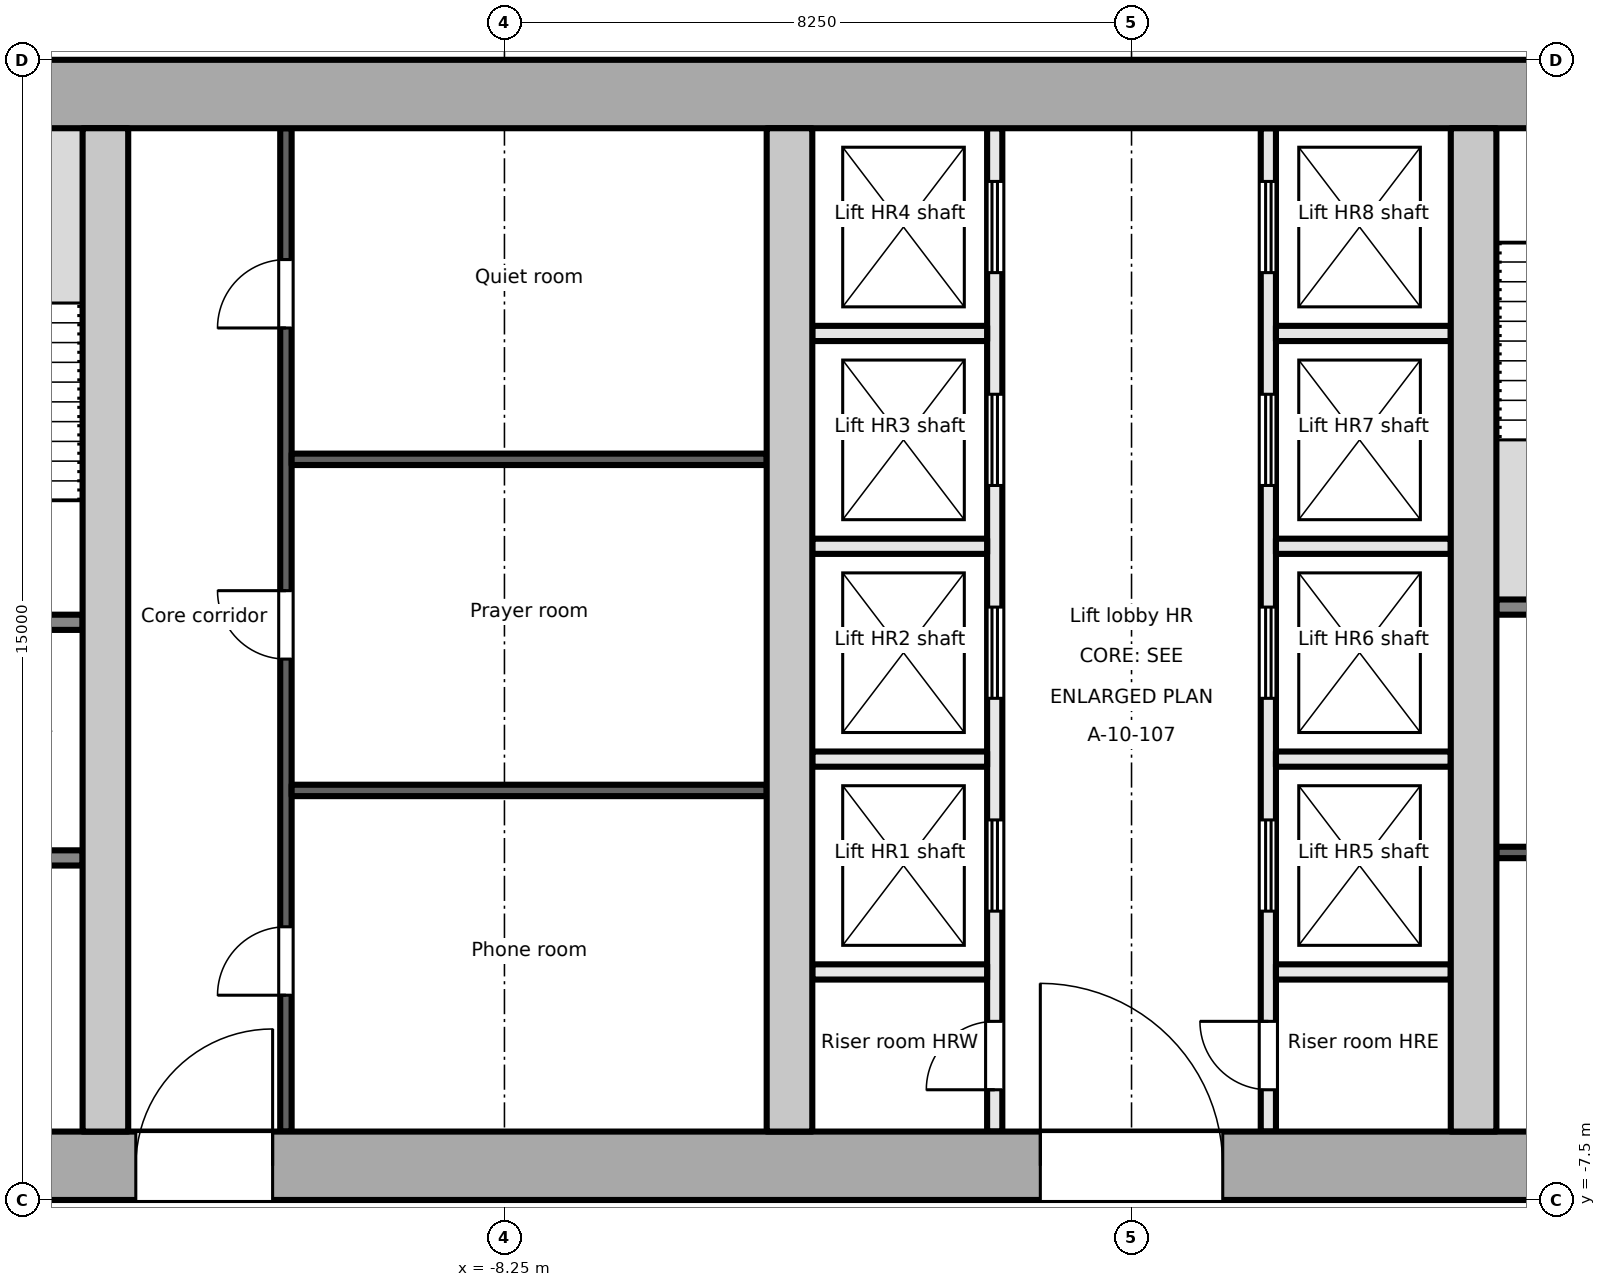
"""IFC4 building model, lengths in metres.
Left out: names, types, materials, properties, quantities, classifications, styles, units other than length and angle.
Written with IfcOpenShell. Run it as: python <this file> out.ifc"""

import sys

from ifc_helpers import new_model, si_unit, direction, frame, frame_2d, origin, place, context, subcontext, project, spatial, rectangle, extrude, element, fill, save


model = new_model("IFC4")
c1 = context("Model", 3, precision=1e-05, world=origin(), true_north=direction((0.0, 1.0)))
c2 = subcontext(c1, "Body", "Model", "MODEL_VIEW")
j1 = project(units=[si_unit("LENGTHUNIT", "METRE"), si_unit("PLANEANGLEUNIT", "RADIAN")], contexts=[c1])
p1 = place(None, origin())
s1 = spatial("IfcSite", under=j1, at=p1, CompositionType="ELEMENT")
p2 = place(p1, origin())
s2 = spatial("IfcBuilding", under=s1, at=p2, CompositionType="ELEMENT")
p3 = place(p2, frame((0.0, 0.0, 217.4)))
s3 = spatial("IfcBuildingStorey", under=s2, at=p3, CompositionType="ELEMENT", Elevation=217.4)
p4 = place(p3, frame((-18.0, -7.05, -0.2), z_axis=(0.0, 0.0, 1.0), x_axis=(1.0, 0.0, 0.0)))
e1 = element("IfcWall", 1, at=p4, inside=s3, PredefinedType="SHEAR", context=c2, shape_type="SweptSolid", body=[
    extrude(rectangle(XDim=36.0, YDim=0.9, at=frame_2d((18.0, 0.0))), origin(), (0.0, 0.0, 1.0), 3.9),
])
p5 = place(p4, frame((4.9, 0.0, 0.2)))
e2 = element("IfcOpeningElement", 2, at=p5, cuts=e1, PredefinedType="OPENING", context=c2, shape_type="SweptSolid", body=[
    extrude(rectangle(XDim=1.8, YDim=2.1, at=frame_2d((0.9, 1.05))), frame((0.0, 0.46, 0.0), z_axis=(0.0, -1.0, 0.0), x_axis=(1.0, 0.0, 0.0)), (0.0, 0.0, 1.0), 0.921),
])
p6 = place(p4, frame((16.8, 0.0, 0.2)))
e3 = element("IfcOpeningElement", 3, at=p6, cuts=e1, PredefinedType="OPENING", context=c2, shape_type="SweptSolid", body=[
    extrude(rectangle(XDim=2.4, YDim=2.1, at=frame_2d((1.2, 1.05))), frame((0.0, 0.46, 0.0), z_axis=(0.0, -1.0, 0.0), x_axis=(1.0, 0.0, 0.0)), (0.0, 0.0, 1.0), 0.921),
])
p7 = place(p4, frame((26.1, 0.0, 0.2)))
e4 = element("IfcOpeningElement", 4, at=p7, cuts=e1, PredefinedType="OPENING", context=c2, shape_type="SweptSolid", body=[
    extrude(rectangle(XDim=2.4, YDim=2.1, at=frame_2d((1.2, 1.05))), frame((0.0, 0.46, 0.0), z_axis=(0.0, -1.0, 0.0), x_axis=(1.0, 0.0, 0.0)), (0.0, 0.0, 1.0), 0.921),
])
p8 = place(p3, frame((-18.0, 7.05, -0.2), z_axis=(0.0, 0.0, 1.0), x_axis=(1.0, 0.0, 0.0)))
e5 = element("IfcWall", 5, at=p8, inside=s3, PredefinedType="SHEAR", context=c2, shape_type="SweptSolid", body=[
    extrude(rectangle(XDim=36.0, YDim=0.9, at=frame_2d((18.0, 0.0))), origin(), (0.0, 0.0, 1.0), 3.9),
])
for number, where, z_axis, x_axis in (
    (6, (-13.5, -6.6, -0.2), (0.0, 0.0, 1.0), (0.0, 1.0, 0.0)),
    (7, (-4.5, -6.6, -0.2), (0.0, 0.0, 1.0), (0.0, 1.0, 0.0)),
    (8, (4.5, -6.6, -0.2), (0.0, 0.0, 1.0), (0.0, 1.0, 0.0)),
):
    element("IfcWall", number, at=place(p3, frame(where, z_axis=z_axis, x_axis=x_axis)), inside=s3, PredefinedType="SHEAR", context=c2, shape_type="SweptSolid", body=[
        extrude(rectangle(XDim=13.2, YDim=0.6, at=frame_2d((6.6, 0.0))), origin(), (0.0, 0.0, 1.0), 3.9),
    ])
p9 = place(p3, frame((-17.1, -3.0, 0.0), z_axis=(0.0, 0.0, 1.0), x_axis=(1.0, 0.0, 0.0)))
e9 = element("IfcWall", 9, at=p9, inside=s3, PredefinedType="PARTITIONING", context=c2, shape_type="SweptSolid", body=[
    extrude(rectangle(XDim=3.3, YDim=0.2, at=frame_2d((1.65, 0.0))), origin(), (0.0, 0.0, 1.0), 3.7),
])
p10 = place(p9, frame((1.1, 0.0, 0.0)))
e10 = element("IfcOpeningElement", 10, at=p10, cuts=e9, PredefinedType="OPENING", context=c2, shape_type="SweptSolid", body=[
    extrude(rectangle(XDim=1.1, YDim=2.1, at=frame_2d((0.55, 1.05))), frame((0.0, 0.111, 0.0), z_axis=(0.0, -1.0, 0.0), x_axis=(1.0, 0.0, 0.0)), (0.0, 0.0, 1.0), 0.221),
])
p11 = place(p3, frame((-17.1, 0.1, 0.0), z_axis=(0.0, 0.0, 1.0), x_axis=(1.0, 0.0, 0.0)))
e11 = element("IfcWall", 11, at=p11, inside=s3, PredefinedType="PARTITIONING", context=c2, shape_type="SweptSolid", body=[
    extrude(rectangle(XDim=3.3, YDim=0.2, at=frame_2d((1.65, 0.0))), origin(), (0.0, 0.0, 1.0), 3.7),
])
p12 = place(p11, frame((1.1, 0.0, 0.0)))
e12 = element("IfcOpeningElement", 12, at=p12, cuts=e11, PredefinedType="OPENING", context=c2, shape_type="SweptSolid", body=[
    extrude(rectangle(XDim=1.1, YDim=2.1, at=frame_2d((0.55, 1.05))), frame((0.0, 0.111, 0.0), z_axis=(0.0, -1.0, 0.0), x_axis=(1.0, 0.0, 0.0)), (0.0, 0.0, 1.0), 0.221),
])
p13 = place(p3, frame((-11.125, -6.6, 0.0), z_axis=(0.0, 0.0, 1.0), x_axis=(0.0, 1.0, 0.0)))
e13 = element("IfcWall", 13, at=p13, inside=s3, PredefinedType="PARTITIONING", context=c2, shape_type="SweptSolid", body=[
    extrude(rectangle(XDim=13.2, YDim=0.15, at=frame_2d((6.6, 0.0))), origin(), (0.0, 0.0, 1.0), 3.7),
])
p14 = place(p13, frame((1.794, 0.0, 0.0)))
e14 = element("IfcOpeningElement", 14, at=p14, cuts=e13, PredefinedType="OPENING", context=c2, shape_type="SweptSolid", body=[
    extrude(rectangle(XDim=0.9, YDim=2.1, at=frame_2d((0.45, 1.05))), frame((0.0, 0.085, 0.0), z_axis=(0.0, -1.0, 0.0), x_axis=(1.0, 0.0, 0.0)), (0.0, 0.0, 1.0), 0.171),
])
p15 = place(p13, frame((6.216, 0.0, 0.0)))
e15 = element("IfcOpeningElement", 15, at=p15, cuts=e13, PredefinedType="OPENING", context=c2, shape_type="SweptSolid", body=[
    extrude(rectangle(XDim=0.9, YDim=2.1, at=frame_2d((0.45, 1.05))), frame((0.0, 0.085, 0.0), z_axis=(0.0, -1.0, 0.0), x_axis=(1.0, 0.0, 0.0)), (0.0, 0.0, 1.0), 0.171),
])
p16 = place(p13, frame((10.572, 0.0, 0.0)))
e16 = element("IfcOpeningElement", 16, at=p16, cuts=e13, PredefinedType="OPENING", context=c2, shape_type="SweptSolid", body=[
    extrude(rectangle(XDim=0.9, YDim=2.1, at=frame_2d((0.45, 1.05))), frame((0.0, 0.085, 0.0), z_axis=(0.0, -1.0, 0.0), x_axis=(1.0, 0.0, 0.0)), (0.0, 0.0, 1.0), 0.171),
])
for number, where, z_axis, x_axis in (
    (17, (-11.05, -2.112, 0.0), (0.0, 0.0, 1.0), (1.0, 0.0, 0.0)),
    (18, (-11.05, 2.244, 0.0), (0.0, 0.0, 1.0), (1.0, 0.0, 0.0)),
):
    element("IfcWall", number, at=place(p3, frame(where, z_axis=z_axis, x_axis=x_axis)), inside=s3, PredefinedType="PARTITIONING", context=c2, shape_type="SweptSolid", body=[
        extrude(rectangle(XDim=6.25, YDim=0.15, at=frame_2d((3.125, 0.0))), origin(), (0.0, 0.0, 1.0), 3.7),
    ])
p17 = place(p3, frame((-1.8, -6.6, 0.0), z_axis=(0.0, 0.0, 1.0), x_axis=(0.0, 1.0, 0.0)))
e19 = element("IfcWall", 19, at=p17, inside=s3, PredefinedType="PARTITIONING", context=c2, shape_type="SweptSolid", body=[
    extrude(rectangle(XDim=13.2, YDim=0.2, at=frame_2d((6.6, 0.0))), origin(), (0.0, 0.0, 1.0), 3.7),
])
p18 = place(p17, frame((0.55, 0.0, 0.0)))
e20 = element("IfcOpeningElement", 20, at=p18, cuts=e19, PredefinedType="OPENING", context=c2, shape_type="SweptSolid", body=[
    extrude(rectangle(XDim=0.9, YDim=2.1, at=frame_2d((0.45, 1.05))), frame((0.0, 0.111, 0.0), z_axis=(0.0, -1.0, 0.0), x_axis=(1.0, 0.0, 0.0)), (0.0, 0.0, 1.0), 0.221),
])
p19 = place(p17, frame((2.9, 0.0, 0.0)))
e21 = element("IfcOpeningElement", 21, at=p19, cuts=e19, PredefinedType="OPENING", context=c2, shape_type="SweptSolid", body=[
    extrude(rectangle(XDim=1.2, YDim=2.1, at=frame_2d((0.6, 1.05))), frame((0.0, 0.111, 0.0), z_axis=(0.0, -1.0, 0.0), x_axis=(1.0, 0.0, 0.0)), (0.0, 0.0, 1.0), 0.221),
])
p20 = place(p17, frame((5.7, 0.0, 0.0)))
e22 = element("IfcOpeningElement", 22, at=p20, cuts=e19, PredefinedType="OPENING", context=c2, shape_type="SweptSolid", body=[
    extrude(rectangle(XDim=1.2, YDim=2.1, at=frame_2d((0.6, 1.05))), frame((0.0, 0.111, 0.0), z_axis=(0.0, -1.0, 0.0), x_axis=(1.0, 0.0, 0.0)), (0.0, 0.0, 1.0), 0.221),
])
p21 = place(p17, frame((8.5, 0.0, 0.0)))
e23 = element("IfcOpeningElement", 23, at=p21, cuts=e19, PredefinedType="OPENING", context=c2, shape_type="SweptSolid", body=[
    extrude(rectangle(XDim=1.2, YDim=2.1, at=frame_2d((0.6, 1.05))), frame((0.0, 0.111, 0.0), z_axis=(0.0, -1.0, 0.0), x_axis=(1.0, 0.0, 0.0)), (0.0, 0.0, 1.0), 0.221),
])
p22 = place(p17, frame((11.3, 0.0, 0.0)))
e24 = element("IfcOpeningElement", 24, at=p22, cuts=e19, PredefinedType="OPENING", context=c2, shape_type="SweptSolid", body=[
    extrude(rectangle(XDim=1.2, YDim=2.1, at=frame_2d((0.6, 1.05))), frame((0.0, 0.111, 0.0), z_axis=(0.0, -1.0, 0.0), x_axis=(1.0, 0.0, 0.0)), (0.0, 0.0, 1.0), 0.221),
])
p23 = place(p3, frame((1.8, -6.6, 0.0), z_axis=(0.0, 0.0, 1.0), x_axis=(0.0, 1.0, 0.0)))
e25 = element("IfcWall", 25, at=p23, inside=s3, PredefinedType="PARTITIONING", context=c2, shape_type="SweptSolid", body=[
    extrude(rectangle(XDim=13.2, YDim=0.2, at=frame_2d((6.6, 0.0))), origin(), (0.0, 0.0, 1.0), 3.7),
])
p24 = place(p23, frame((0.55, 0.0, 0.0)))
e26 = element("IfcOpeningElement", 26, at=p24, cuts=e25, PredefinedType="OPENING", context=c2, shape_type="SweptSolid", body=[
    extrude(rectangle(XDim=0.9, YDim=2.1, at=frame_2d((0.45, 1.05))), frame((0.0, 0.111, 0.0), z_axis=(0.0, -1.0, 0.0), x_axis=(1.0, 0.0, 0.0)), (0.0, 0.0, 1.0), 0.221),
])
p25 = place(p23, frame((2.9, 0.0, 0.0)))
e27 = element("IfcOpeningElement", 27, at=p25, cuts=e25, PredefinedType="OPENING", context=c2, shape_type="SweptSolid", body=[
    extrude(rectangle(XDim=1.2, YDim=2.1, at=frame_2d((0.6, 1.05))), frame((0.0, 0.111, 0.0), z_axis=(0.0, -1.0, 0.0), x_axis=(1.0, 0.0, 0.0)), (0.0, 0.0, 1.0), 0.221),
])
p26 = place(p23, frame((5.7, 0.0, 0.0)))
e28 = element("IfcOpeningElement", 28, at=p26, cuts=e25, PredefinedType="OPENING", context=c2, shape_type="SweptSolid", body=[
    extrude(rectangle(XDim=1.2, YDim=2.1, at=frame_2d((0.6, 1.05))), frame((0.0, 0.111, 0.0), z_axis=(0.0, -1.0, 0.0), x_axis=(1.0, 0.0, 0.0)), (0.0, 0.0, 1.0), 0.221),
])
p27 = place(p23, frame((8.5, 0.0, 0.0)))
e29 = element("IfcOpeningElement", 29, at=p27, cuts=e25, PredefinedType="OPENING", context=c2, shape_type="SweptSolid", body=[
    extrude(rectangle(XDim=1.2, YDim=2.1, at=frame_2d((0.6, 1.05))), frame((0.0, 0.111, 0.0), z_axis=(0.0, -1.0, 0.0), x_axis=(1.0, 0.0, 0.0)), (0.0, 0.0, 1.0), 0.221),
])
p28 = place(p23, frame((11.3, 0.0, 0.0)))
e30 = element("IfcOpeningElement", 30, at=p28, cuts=e25, PredefinedType="OPENING", context=c2, shape_type="SweptSolid", body=[
    extrude(rectangle(XDim=1.2, YDim=2.1, at=frame_2d((0.6, 1.05))), frame((0.0, 0.111, 0.0), z_axis=(0.0, -1.0, 0.0), x_axis=(1.0, 0.0, 0.0)), (0.0, 0.0, 1.0), 0.221),
])
for number, where, z_axis, x_axis in (
    (31, (-4.2, -1.7, 0.0), (0.0, 0.0, 1.0), (1.0, 0.0, 0.0)),
    (32, (-4.2, 1.1, 0.0), (0.0, 0.0, 1.0), (1.0, 0.0, 0.0)),
    (33, (-4.2, 3.9, 0.0), (0.0, 0.0, 1.0), (1.0, 0.0, 0.0)),
    (34, (-4.2, -4.5, 0.0), (0.0, 0.0, 1.0), (1.0, 0.0, 0.0)),
    (35, (1.9, -1.7, 0.0), (0.0, 0.0, 1.0), (1.0, 0.0, 0.0)),
    (36, (1.9, 1.1, 0.0), (0.0, 0.0, 1.0), (1.0, 0.0, 0.0)),
    (37, (1.9, 3.9, 0.0), (0.0, 0.0, 1.0), (1.0, 0.0, 0.0)),
    (38, (1.9, -4.5, 0.0), (0.0, 0.0, 1.0), (1.0, 0.0, 0.0)),
):
    element("IfcWall", number, at=place(p3, frame(where, z_axis=z_axis, x_axis=x_axis)), inside=s3, PredefinedType="PARTITIONING", context=c2, shape_type="SweptSolid", body=[
        extrude(rectangle(XDim=2.3, YDim=0.2, at=frame_2d((1.15, 0.0))), origin(), (0.0, 0.0, 1.0), 3.7),
    ])
p29 = place(p3, frame((4.8, 0.3, 0.0), z_axis=(0.0, 0.0, 1.0), x_axis=(1.0, 0.0, 0.0)))
e39 = element("IfcWall", 39, at=p29, inside=s3, PredefinedType="PARTITIONING", context=c2, shape_type="SweptSolid", body=[
    extrude(rectangle(XDim=3.15, YDim=0.2, at=frame_2d((1.575, 0.0))), origin(), (0.0, 0.0, 1.0), 3.7),
])
p30 = place(p3, frame((4.8, -2.928, 0.0), z_axis=(0.0, 0.0, 1.0), x_axis=(1.0, 0.0, 0.0)))
e40 = element("IfcWall", 40, at=p30, inside=s3, PredefinedType="PARTITIONING", context=c2, shape_type="SweptSolid", body=[
    extrude(rectangle(XDim=3.15, YDim=0.15, at=frame_2d((1.575, 0.0))), origin(), (0.0, 0.0, 1.0), 3.7),
])
p31 = place(p14, origin())
e41 = element("IfcDoor", 41, at=p31, inside=s3, OperationType="SINGLE_SWING_LEFT", PredefinedType="DOOR", context=c2, shape_type="SweptSolid", body=[
    extrude(rectangle(XDim=0.9, YDim=2.1, at=frame_2d((0.45, 1.05))), frame((0.0, 0.025, 0.0), z_axis=(0.0, -1.0, 0.0), x_axis=(1.0, 0.0, 0.0)), (0.0, 0.0, 1.0), 0.05),
])
fill(e14, e41)
p32 = place(p15, origin())
e42 = element("IfcDoor", 42, at=p32, inside=s3, OperationType="SINGLE_SWING_RIGHT", PredefinedType="DOOR", context=c2, shape_type="SweptSolid", body=[
    extrude(rectangle(XDim=0.9, YDim=2.1, at=frame_2d((0.45, 1.05))), frame((0.0, 0.025, 0.0), z_axis=(0.0, -1.0, 0.0), x_axis=(1.0, 0.0, 0.0)), (0.0, 0.0, 1.0), 0.05),
])
fill(e15, e42)
p33 = place(p16, origin())
e43 = element("IfcDoor", 43, at=p33, inside=s3, OperationType="SINGLE_SWING_LEFT", PredefinedType="DOOR", context=c2, shape_type="SweptSolid", body=[
    extrude(rectangle(XDim=0.9, YDim=2.1, at=frame_2d((0.45, 1.05))), frame((0.0, 0.025, 0.0), z_axis=(0.0, -1.0, 0.0), x_axis=(1.0, 0.0, 0.0)), (0.0, 0.0, 1.0), 0.05),
])
fill(e16, e43)
p34 = place(p5, origin())
e44 = element("IfcDoor", 44, at=p34, inside=s3, OperationType="SINGLE_SWING_RIGHT", PredefinedType="DOOR", context=c2, shape_type="SweptSolid", body=[
    extrude(rectangle(XDim=1.8, YDim=2.1, at=frame_2d((0.9, 1.05))), frame((0.0, 0.025, 0.0), z_axis=(0.0, -1.0, 0.0), x_axis=(1.0, 0.0, 0.0)), (0.0, 0.0, 1.0), 0.05),
])
fill(e2, e44)
p35 = place(p18, origin())
e45 = element("IfcDoor", 45, at=p35, inside=s3, OperationType="SINGLE_SWING_LEFT", PredefinedType="DOOR", context=c2, shape_type="SweptSolid", body=[
    extrude(rectangle(XDim=0.9, YDim=2.1, at=frame_2d((0.45, 1.05))), frame((0.0, 0.025, 0.0), z_axis=(0.0, -1.0, 0.0), x_axis=(1.0, 0.0, 0.0)), (0.0, 0.0, 1.0), 0.05),
])
fill(e20, e45)
p36 = place(p19, origin())
e46 = element("IfcDoor", 46, at=p36, inside=s3, OperationType="DOUBLE_DOOR_SLIDING", PredefinedType="DOOR", context=c2, shape_type="SweptSolid", body=[
    extrude(rectangle(XDim=1.2, YDim=2.1, at=frame_2d((0.6, 1.05))), frame((0.0, 0.025, 0.0), z_axis=(0.0, -1.0, 0.0), x_axis=(1.0, 0.0, 0.0)), (0.0, 0.0, 1.0), 0.05),
])
fill(e21, e46)
p37 = place(p20, origin())
e47 = element("IfcDoor", 47, at=p37, inside=s3, OperationType="DOUBLE_DOOR_SLIDING", PredefinedType="DOOR", context=c2, shape_type="SweptSolid", body=[
    extrude(rectangle(XDim=1.2, YDim=2.1, at=frame_2d((0.6, 1.05))), frame((0.0, 0.025, 0.0), z_axis=(0.0, -1.0, 0.0), x_axis=(1.0, 0.0, 0.0)), (0.0, 0.0, 1.0), 0.05),
])
fill(e22, e47)
p38 = place(p21, origin())
e48 = element("IfcDoor", 48, at=p38, inside=s3, OperationType="DOUBLE_DOOR_SLIDING", PredefinedType="DOOR", context=c2, shape_type="SweptSolid", body=[
    extrude(rectangle(XDim=1.2, YDim=2.1, at=frame_2d((0.6, 1.05))), frame((0.0, 0.025, 0.0), z_axis=(0.0, -1.0, 0.0), x_axis=(1.0, 0.0, 0.0)), (0.0, 0.0, 1.0), 0.05),
])
fill(e23, e48)
p39 = place(p22, origin())
e49 = element("IfcDoor", 49, at=p39, inside=s3, OperationType="DOUBLE_DOOR_SLIDING", PredefinedType="DOOR", context=c2, shape_type="SweptSolid", body=[
    extrude(rectangle(XDim=1.2, YDim=2.1, at=frame_2d((0.6, 1.05))), frame((0.0, 0.025, 0.0), z_axis=(0.0, -1.0, 0.0), x_axis=(1.0, 0.0, 0.0)), (0.0, 0.0, 1.0), 0.05),
])
fill(e24, e49)
p40 = place(p24, origin())
e50 = element("IfcDoor", 50, at=p40, inside=s3, OperationType="SINGLE_SWING_RIGHT", PredefinedType="DOOR", context=c2, shape_type="SweptSolid", body=[
    extrude(rectangle(XDim=0.9, YDim=2.1, at=frame_2d((0.45, 1.05))), frame((0.0, 0.025, 0.0), z_axis=(0.0, -1.0, 0.0), x_axis=(1.0, 0.0, 0.0)), (0.0, 0.0, 1.0), 0.05),
])
fill(e26, e50)
p41 = place(p25, origin())
e51 = element("IfcDoor", 51, at=p41, inside=s3, OperationType="DOUBLE_DOOR_SLIDING", PredefinedType="DOOR", context=c2, shape_type="SweptSolid", body=[
    extrude(rectangle(XDim=1.2, YDim=2.1, at=frame_2d((0.6, 1.05))), frame((0.0, 0.025, 0.0), z_axis=(0.0, -1.0, 0.0), x_axis=(1.0, 0.0, 0.0)), (0.0, 0.0, 1.0), 0.05),
])
fill(e27, e51)
p42 = place(p26, origin())
e52 = element("IfcDoor", 52, at=p42, inside=s3, OperationType="DOUBLE_DOOR_SLIDING", PredefinedType="DOOR", context=c2, shape_type="SweptSolid", body=[
    extrude(rectangle(XDim=1.2, YDim=2.1, at=frame_2d((0.6, 1.05))), frame((0.0, 0.025, 0.0), z_axis=(0.0, -1.0, 0.0), x_axis=(1.0, 0.0, 0.0)), (0.0, 0.0, 1.0), 0.05),
])
fill(e28, e52)
p43 = place(p27, origin())
e53 = element("IfcDoor", 53, at=p43, inside=s3, OperationType="DOUBLE_DOOR_SLIDING", PredefinedType="DOOR", context=c2, shape_type="SweptSolid", body=[
    extrude(rectangle(XDim=1.2, YDim=2.1, at=frame_2d((0.6, 1.05))), frame((0.0, 0.025, 0.0), z_axis=(0.0, -1.0, 0.0), x_axis=(1.0, 0.0, 0.0)), (0.0, 0.0, 1.0), 0.05),
])
fill(e29, e53)
p44 = place(p28, origin())
e54 = element("IfcDoor", 54, at=p44, inside=s3, OperationType="DOUBLE_DOOR_SLIDING", PredefinedType="DOOR", context=c2, shape_type="SweptSolid", body=[
    extrude(rectangle(XDim=1.2, YDim=2.1, at=frame_2d((0.6, 1.05))), frame((0.0, 0.025, 0.0), z_axis=(0.0, -1.0, 0.0), x_axis=(1.0, 0.0, 0.0)), (0.0, 0.0, 1.0), 0.05),
])
fill(e30, e54)
p45 = place(p6, origin())
e55 = element("IfcDoor", 55, at=p45, inside=s3, OperationType="DOUBLE_DOOR_DOUBLE_SWING", PredefinedType="DOOR", context=c2, shape_type="SweptSolid", body=[
    extrude(rectangle(XDim=2.4, YDim=2.1, at=frame_2d((1.2, 1.05))), frame((0.0, 0.025, 0.0), z_axis=(0.0, -1.0, 0.0), x_axis=(1.0, 0.0, 0.0)), (0.0, 0.0, 1.0), 0.05),
])
fill(e3, e55)
save(model, sys.argv[1])
